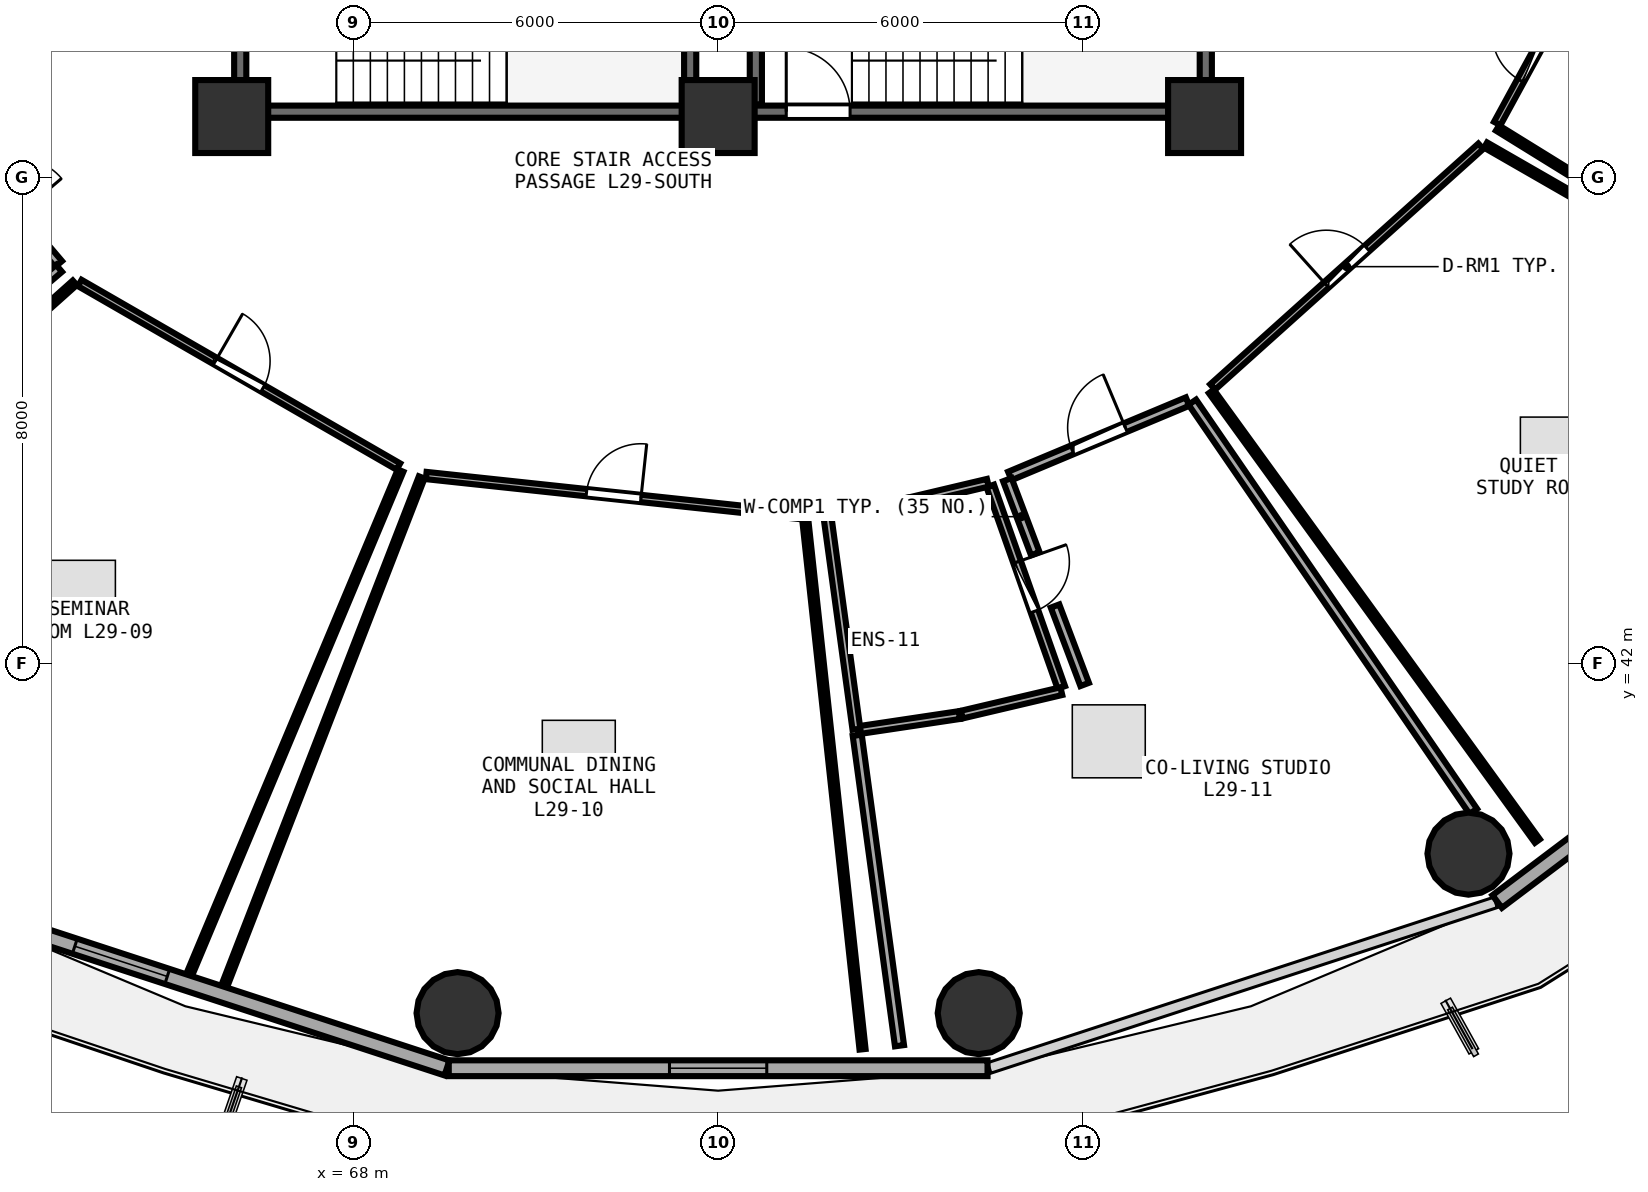
"""IFC4 building model, lengths in metres.
Left out: names, types, materials, properties, quantities, classifications, styles, units other than length and angle.
Written with IfcOpenShell. Run it as: python <this file> out.ifc"""

import sys

from ifc_helpers import new_model, si_unit, direction, frame, frame_2d, origin, origin_2d, place, context, subcontext, project, spatial, rectangle, circle, extrude, element, fill, save


model = new_model("IFC4")
c1 = context("Model", 3, precision=1e-05, world=origin(), true_north=direction((0.0, 1.0)))
c2 = subcontext(c1, "Body", "Model", "MODEL_VIEW")
j1 = project(units=[si_unit("LENGTHUNIT", "METRE"), si_unit("PLANEANGLEUNIT", "RADIAN")], contexts=[c1])
p1 = place(None, origin())
s1 = spatial("IfcSite", under=j1, at=p1, CompositionType="ELEMENT")
p2 = place(p1, origin())
s2 = spatial("IfcBuilding", under=s1, at=p2, CompositionType="ELEMENT")
p3 = place(p2, frame((0.0, 0.0, 113.85)))
s3 = spatial("IfcBuildingStorey", under=s2, at=p3, CompositionType="ELEMENT", Elevation=113.85)
for number, where, z_axis, x_axis in (
    (1, (66.0, 51.0, 0.0), (0.0, 0.0, 1.0), (1.0, 0.0, 0.0)),
    (2, (74.0, 51.0, 0.0), (0.0, 0.0, 1.0), (1.0, 0.0, 0.0)),
    (3, (82.0, 51.0, 0.0), (0.0, 0.0, 1.0), (1.0, 0.0, 0.0)),
):
    element("IfcColumn", number, at=place(p3, frame(where, z_axis=z_axis, x_axis=x_axis)), inside=s3, PredefinedType="PILASTER", context=c2, shape_type="SweptSolid", body=[
        extrude(rectangle(XDim=1.2, YDim=1.2, at=origin_2d()), origin(), (0.0, 0.0, 1.0), 3.75),
    ])
for number, where, z_axis, x_axis in (
    (4, (69.714, 36.255, 0.0), (0.0, 0.0, 1.0), (1.0, 0.0, 0.0)),
    (5, (78.286, 36.255, 0.0), (0.0, 0.0, 1.0), (1.0, 0.0, 0.0)),
    (6, (86.34, 38.878, 0.0), (0.0, 0.0, 1.0), (1.0, 0.0, 0.0)),
):
    element("IfcColumn", number, at=place(p3, frame(where, z_axis=z_axis, x_axis=x_axis)), inside=s3, PredefinedType="COLUMN", context=c2, shape_type="SweptSolid", body=[
        extrude(circle(Radius=0.675, at=origin_2d()), origin(), (0.0, 0.0, 1.0), 3.75),
    ])
p4 = place(p3, frame((61.214, 38.077, 0.0), z_axis=(0.0, 0.0, 1.0), x_axis=(0.950471101963, -0.310812941064, 0.0)))
e7 = element("IfcWall", 7, at=p4, inside=s3, PredefinedType="SOLIDWALL", context=c2, shape_type="SweptSolid", body=[
    extrude(rectangle(XDim=8.76, YDim=0.26, at=frame_2d((4.38, 0.0))), origin(), (0.0, 0.0, 1.0), 3.475),
])
p5 = place(p4, frame((2.32, 0.0, 0.85)))
e8 = element("IfcOpeningElement", 8, at=p5, cuts=e7, PredefinedType="OPENING", context=c2, shape_type="SweptSolid", body=[
    extrude(rectangle(XDim=1.6, YDim=1.45, at=frame_2d((0.8, 0.725))), frame((0.0, 0.14, 0.0), z_axis=(0.0, -1.0, 0.0), x_axis=(1.0, 0.0, 0.0)), (0.0, 0.0, 1.0), 0.28),
])
p6 = place(p3, frame((69.57, 35.349, 0.0), z_axis=(0.0, 0.0, 1.0), x_axis=(1.0, 0.0, 0.0)))
e9 = element("IfcWall", 9, at=p6, inside=s3, PredefinedType="SOLIDWALL", context=c2, shape_type="SweptSolid", body=[
    extrude(rectangle(XDim=8.861, YDim=0.26, at=frame_2d((4.43, 0.0))), origin(), (0.0, 0.0, 1.0), 3.475),
])
p7 = place(p6, frame((3.63, 0.0, 0.85)))
e10 = element("IfcOpeningElement", 10, at=p7, cuts=e9, PredefinedType="OPENING", context=c2, shape_type="SweptSolid", body=[
    extrude(rectangle(XDim=1.6, YDim=1.45, at=frame_2d((0.8, 0.725))), frame((0.0, 0.14, 0.0), z_axis=(0.0, -1.0, 0.0), x_axis=(1.0, 0.0, 0.0)), (0.0, 0.0, 1.0), 0.28),
])
p8 = place(p3, frame((86.812, 38.09, 0.0), z_axis=(0.0, 0.0, 1.0), x_axis=(0.798501507879, 0.601992808857, 0.0)))
e11 = element("IfcWall", 11, at=p8, inside=s3, PredefinedType="SOLIDWALL", context=c2, shape_type="SweptSolid", body=[
    extrude(rectangle(XDim=8.499, YDim=0.26, at=frame_2d((4.25, 0.0))), origin(), (0.0, 0.0, 1.0), 3.475),
])
p9 = place(p8, frame((3.45, 0.0, 0.85)))
e12 = element("IfcOpeningElement", 12, at=p9, cuts=e11, PredefinedType="OPENING", context=c2, shape_type="SweptSolid", body=[
    extrude(rectangle(XDim=1.6, YDim=1.45, at=frame_2d((0.8, 0.725))), frame((0.0, 0.14, 0.0), z_axis=(0.0, -1.0, 0.0), x_axis=(1.0, 0.0, 0.0)), (0.0, 0.0, 1.0), 0.28),
])
p10 = place(p3, frame((74.0, 51.08, 0.0), z_axis=(0.0, 0.0, 1.0), x_axis=(1.0, 0.0, 0.0)))
e13 = element("IfcWall", 13, at=p10, inside=s3, PredefinedType="SHEAR", context=c2, shape_type="SweptSolid", body=[
    extrude(rectangle(XDim=7.9, YDim=0.2, at=frame_2d((3.95, 0.0))), origin(), (0.0, 0.0, 1.0), 3.49),
])
p11 = place(p10, frame((1.12, 0.0, 0.0)))
e14 = element("IfcOpeningElement", 14, at=p11, cuts=e13, PredefinedType="OPENING", context=c2, shape_type="SweptSolid", body=[
    extrude(rectangle(XDim=1.05, YDim=2.1, at=frame_2d((0.525, 1.05))), frame((0.0, 0.11, 0.0), z_axis=(0.0, -1.0, 0.0), x_axis=(1.0, 0.0, 0.0)), (0.0, 0.0, 1.0), 0.22),
])
for number, where, z_axis, x_axis in (
    (15, (82.02, 51.2, 0.0), (0.0, 0.0, 1.0), (0.0, 1.0, 0.0)),
    (16, (74.62, 54.27, 0.0), (0.0, 0.0, 1.0), (0.0, -1.0, 0.0)),
):
    element("IfcWall", number, at=place(p3, frame(where, z_axis=z_axis, x_axis=x_axis)), inside=s3, PredefinedType="SHEAR", context=c2, shape_type="SweptSolid", body=[
        extrude(rectangle(XDim=3.07, YDim=0.2, at=frame_2d((1.535, 0.0))), origin(), (0.0, 0.0, 1.0), 3.49),
    ])
p12 = place(p3, frame((66.26, 51.08, 0.0), z_axis=(0.0, 0.0, 1.0), x_axis=(1.0, 0.0, 0.0)))
e17 = element("IfcWall", 17, at=p12, inside=s3, PredefinedType="SHEAR", context=c2, shape_type="SweptSolid", body=[
    extrude(rectangle(XDim=7.16, YDim=0.2, at=frame_2d((3.58, 0.0))), origin(), (0.0, 0.0, 1.0), 3.49),
])
p13 = place(p3, frame((73.54, 51.2, 0.0), z_axis=(0.0, 0.0, 1.0), x_axis=(0.0, 1.0, 0.0)))
e18 = element("IfcWall", 18, at=p13, inside=s3, PredefinedType="SHEAR", context=c2, shape_type="SweptSolid", body=[
    extrude(rectangle(XDim=3.07, YDim=0.2, at=frame_2d((1.535, 0.0))), origin(), (0.0, 0.0, 1.0), 3.49),
])
p14 = place(p3, frame((66.14, 54.27, 0.0), z_axis=(0.0, 0.0, 1.0), x_axis=(0.0, -1.0, 0.0)))
e19 = element("IfcWall", 19, at=p14, inside=s3, PredefinedType="SHEAR", context=c2, shape_type="SweptSolid", body=[
    extrude(rectangle(XDim=3.07, YDim=0.2, at=frame_2d((1.535, 0.0))), origin(), (0.0, 0.0, 1.0), 3.49),
])
p15 = place(p14, frame((1.01, 0.0, 0.0)))
e20 = element("IfcOpeningElement", 20, at=p15, cuts=e19, PredefinedType="OPENING", context=c2, shape_type="SweptSolid", body=[
    extrude(rectangle(XDim=1.05, YDim=2.1, at=frame_2d((0.525, 1.05))), frame((0.0, 0.11, 0.0), z_axis=(0.0, -1.0, 0.0), x_axis=(1.0, 0.0, 0.0)), (0.0, 0.0, 1.0), 0.22),
])
p16 = place(p3, frame((61.189, 50.883, 0.0), z_axis=(0.0, 0.0, 1.0), x_axis=(0.647807427381, -0.761804132983, 0.0)))
e21 = element("IfcWall", 21, at=p16, inside=s3, PredefinedType="PARTITIONING", context=c2, shape_type="SweptSolid", body=[
    extrude(rectangle(XDim=3.031, YDim=0.15, at=frame_2d((1.515, 0.0))), origin(), (0.0, 0.0, 1.0), 2.925),
])
p17 = place(p16, frame((1.04, 0.0, 0.0)))
e22 = element("IfcOpeningElement", 22, at=p17, cuts=e21, PredefinedType="OPENING", context=c2, shape_type="SweptSolid", body=[
    extrude(rectangle(XDim=0.95, YDim=2.08, at=frame_2d((0.475, 1.04))), frame((0.0, 0.085, 0.0), z_axis=(0.0, -1.0, 0.0), x_axis=(1.0, 0.0, 0.0)), (0.0, 0.0, 1.0), 0.17),
])
p18 = place(p3, frame((63.501, 48.263, 0.0), z_axis=(0.0, 0.0, 1.0), x_axis=(0.866473771155, -0.499222599548, 0.0)))
e23 = element("IfcWall", 23, at=p18, inside=s3, PredefinedType="PARTITIONING", context=c2, shape_type="SweptSolid", body=[
    extrude(rectangle(XDim=6.048, YDim=0.12, at=frame_2d((3.024, 0.0))), origin(), (0.0, 0.0, 1.0), 2.925),
])
p19 = place(p18, frame((2.574, 0.0, 0.0)))
e24 = element("IfcOpeningElement", 24, at=p19, cuts=e23, PredefinedType="OPENING", context=c2, shape_type="SweptSolid", body=[
    extrude(rectangle(XDim=0.9, YDim=2.08, at=frame_2d((0.45, 1.04))), frame((0.0, 0.07, 0.0), z_axis=(0.0, -1.0, 0.0), x_axis=(1.0, 0.0, 0.0)), (0.0, 0.0, 1.0), 0.14),
])
p20 = place(p3, frame((69.199, 45.097, 0.0), z_axis=(0.0, 0.0, 1.0), x_axis=(0.994336816939, -0.10627461823, 0.0)))
e25 = element("IfcWall", 25, at=p20, inside=s3, PredefinedType="PARTITIONING", context=c2, shape_type="SweptSolid", body=[
    extrude(rectangle(XDim=6.203, YDim=0.12, at=frame_2d((3.101, 0.0))), origin(), (0.0, 0.0, 1.0), 3.48),
])
p21 = place(p20, frame((2.651, 0.0, 0.0)))
e26 = element("IfcOpeningElement", 26, at=p21, cuts=e25, PredefinedType="OPENING", context=c2, shape_type="SweptSolid", body=[
    extrude(rectangle(XDim=0.9, YDim=2.08, at=frame_2d((0.45, 1.04))), frame((0.0, 0.07, 0.0), z_axis=(0.0, -1.0, 0.0), x_axis=(1.0, 0.0, 0.0)), (0.0, 0.0, 1.0), 0.14),
])
p22 = place(p3, frame((78.475, 44.925, 0.0), z_axis=(0.0, 0.0, 1.0), x_axis=(0.332667472429, -0.943044194504, 0.0)))
e27 = element("IfcWall", 27, at=p22, inside=s3, PredefinedType="PLUMBINGWALL", context=c2, shape_type="SweptSolid", body=[
    extrude(rectangle(XDim=3.514, YDim=0.13, at=frame_2d((1.757, 0.0))), origin(), (0.0, 0.0, 1.0), 2.925),
])
p23 = place(p22, frame((1.327, 0.0, 0.0)))
e28 = element("IfcOpeningElement", 28, at=p23, cuts=e27, PredefinedType="OPENING", context=c2, shape_type="SweptSolid", body=[
    extrude(rectangle(XDim=0.86, YDim=2.05, at=frame_2d((0.43, 1.025))), frame((0.0, 0.075, 0.0), z_axis=(0.0, -1.0, 0.0), x_axis=(1.0, 0.0, 0.0)), (0.0, 0.0, 1.0), 0.15),
])
p24 = place(p3, frame((78.797, 45.089, 0.0), z_axis=(0.0, 0.0, 1.0), x_axis=(0.922451198241, 0.386113696809, 0.0)))
e29 = element("IfcWall", 29, at=p24, inside=s3, PredefinedType="PARTITIONING", context=c2, shape_type="SweptSolid", body=[
    extrude(rectangle(XDim=3.169, YDim=0.15, at=frame_2d((1.584, 0.0))), origin(), (0.0, 0.0, 1.0), 2.925),
])
p25 = place(p24, frame((1.11, 0.0, 0.0)))
e30 = element("IfcOpeningElement", 30, at=p25, cuts=e29, PredefinedType="OPENING", context=c2, shape_type="SweptSolid", body=[
    extrude(rectangle(XDim=0.95, YDim=2.08, at=frame_2d((0.475, 1.04))), frame((0.0, 0.085, 0.0), z_axis=(0.0, -1.0, 0.0), x_axis=(1.0, 0.0, 0.0)), (0.0, 0.0, 1.0), 0.17),
])
p26 = place(p3, frame((82.133, 46.552, 0.0), z_axis=(0.0, 0.0, 1.0), x_axis=(0.744127280309, 0.668037866217, 0.0)))
e31 = element("IfcWall", 31, at=p26, inside=s3, PredefinedType="PARTITIONING", context=c2, shape_type="SweptSolid", body=[
    extrude(rectangle(XDim=5.926, YDim=0.12, at=frame_2d((2.963, 0.0))), origin(), (0.0, 0.0, 1.0), 2.925),
])
p27 = place(p26, frame((2.513, 0.0, 0.0)))
e32 = element("IfcOpeningElement", 32, at=p27, cuts=e31, PredefinedType="OPENING", context=c2, shape_type="SweptSolid", body=[
    extrude(rectangle(XDim=0.9, YDim=2.08, at=frame_2d((0.45, 1.04))), frame((0.0, 0.07, 0.0), z_axis=(0.0, -1.0, 0.0), x_axis=(1.0, 0.0, 0.0)), (0.0, 0.0, 1.0), 0.14),
])
p28 = place(p3, frame((86.813, 50.885, 0.0), z_axis=(0.0, 0.0, 1.0), x_axis=(0.478749799851, 0.877951381993, 0.0)))
e33 = element("IfcWall", 33, at=p28, inside=s3, PredefinedType="PARTITIONING", context=c2, shape_type="SweptSolid", body=[
    extrude(rectangle(XDim=2.508, YDim=0.12, at=frame_2d((1.254, 0.0))), origin(), (0.0, 0.0, 1.0), 2.925),
])
p29 = place(p28, frame((0.804, 0.0, 0.0)))
e34 = element("IfcOpeningElement", 34, at=p29, cuts=e33, PredefinedType="OPENING", context=c2, shape_type="SweptSolid", body=[
    extrude(rectangle(XDim=0.9, YDim=2.08, at=frame_2d((0.45, 1.04))), frame((0.0, 0.07, 0.0), z_axis=(0.0, -1.0, 0.0), x_axis=(1.0, 0.0, 0.0)), (0.0, 0.0, 1.0), 0.14),
])
p30 = place(p3, frame((63.16, 48.503, 0.0), z_axis=(0.0, 0.0, 1.0), x_axis=(-0.761665255774, -0.647970707784, 0.0)))
e35 = element("IfcWall", 35, at=p30, inside=s3, PredefinedType="PARTITIONING", context=c2, shape_type="SweptSolid", body=[
    extrude(rectangle(XDim=9.41, YDim=0.15, at=frame_2d((4.705, 0.0))), origin(), (0.0, 0.0, 1.0), 2.975),
])
p31 = place(p3, frame((68.778, 45.177, 0.0), z_axis=(0.0, 0.0, 1.0), x_axis=(-0.386794233591, -0.922166048421, 0.0)))
e36 = element("IfcWall", 36, at=p31, inside=s3, PredefinedType="PARTITIONING", context=c2, shape_type="SweptSolid", body=[
    extrude(rectangle(XDim=8.923, YDim=0.1, at=frame_2d((4.461, 0.0))), origin(), (0.0, 0.0, 1.0), 2.925),
])
p32 = place(p3, frame((56.424, 42.017, 0.0), z_axis=(0.0, 0.0, 1.0), x_axis=(0.745731207234, 0.666246926115, 0.0)))
e37 = element("IfcWall", 37, at=p32, inside=s3, PredefinedType="PARTITIONING", context=c2, shape_type="SweptSolid", body=[
    extrude(rectangle(XDim=9.381, YDim=0.1, at=frame_2d((4.69, 0.0))), origin(), (0.0, 0.0, 1.0), 2.975),
])
p33 = place(p3, frame((75.43, 44.391, 0.0), z_axis=(0.0, 0.0, 1.0), x_axis=(0.107541262508, -0.994200622037, 0.0)))
e38 = element("IfcWall", 38, at=p33, inside=s3, PredefinedType="PARTITIONING", context=c2, shape_type="SweptSolid", body=[
    extrude(rectangle(XDim=8.781, YDim=0.1, at=frame_2d((4.391, 0.0))), origin(), (0.0, 0.0, 1.0), 2.975),
])
p34 = place(p3, frame((65.903, 36.765, 0.0), z_axis=(0.0, 0.0, 1.0), x_axis=(0.361863971294, 0.932230908241, 0.0)))
e39 = element("IfcWall", 39, at=p34, inside=s3, PredefinedType="PARTITIONING", context=c2, shape_type="SweptSolid", body=[
    extrude(rectangle(XDim=8.904, YDim=0.1, at=frame_2d((4.452, 0.0))), origin(), (0.0, 0.0, 1.0), 2.925),
])
p35 = place(p3, frame((75.811, 44.47, 0.0), z_axis=(0.0, 0.0, 1.0), x_axis=(0.98880166122, 0.149235635049, 0.0)))
e40 = element("IfcWall", 40, at=p35, inside=s3, PredefinedType="PLUMBINGWALL", context=c2, shape_type="SweptSolid", body=[
    extrude(rectangle(XDim=1.32, YDim=0.13, at=frame_2d((0.66, 0.0))), origin(), (0.0, 0.0, 1.0), 3.48),
])
p36 = place(p3, frame((77.156, 44.675, 0.0), z_axis=(0.0, 0.0, 1.0), x_axis=(0.9731536302, 0.23015649465, 0.0)))
e41 = element("IfcWall", 41, at=p36, inside=s3, PredefinedType="PLUMBINGWALL", context=c2, shape_type="SweptSolid", body=[
    extrude(rectangle(XDim=1.315, YDim=0.13, at=frame_2d((0.658, 0.0))), origin(), (0.0, 0.0, 1.0), 3.48),
])
p37 = place(p3, frame((79.645, 41.55, 0.0), z_axis=(0.0, 0.0, 1.0), x_axis=(-0.973371483065, -0.229233409337, 0.0)))
e42 = element("IfcWall", 42, at=p37, inside=s3, PredefinedType="PLUMBINGWALL", context=c2, shape_type="SweptSolid", body=[
    extrude(rectangle(XDim=1.683, YDim=0.13, at=frame_2d((0.841, 0.0))), origin(), (0.0, 0.0, 1.0), 2.925),
])
p38 = place(p3, frame((77.967, 41.157, 0.0), z_axis=(0.0, 0.0, 1.0), x_axis=(-0.988985070507, -0.148015304326, 0.0)))
e43 = element("IfcWall", 43, at=p38, inside=s3, PredefinedType="PLUMBINGWALL", context=c2, shape_type="SweptSolid", body=[
    extrude(rectangle(XDim=1.689, YDim=0.13, at=frame_2d((0.844, 0.0))), origin(), (0.0, 0.0, 1.0), 3.48),
])
p39 = place(p3, frame((76.274, 40.924, 0.0), z_axis=(0.0, 0.0, 1.0), x_axis=(-0.135180605541, 0.99082097469, 0.0)))
e44 = element("IfcWall", 44, at=p39, inside=s3, PredefinedType="PLUMBINGWALL", context=c2, shape_type="SweptSolid", body=[
    extrude(rectangle(XDim=3.556, YDim=0.13, at=frame_2d((1.778, 0.0))), origin(), (0.0, 0.0, 1.0), 3.175),
])
p40 = place(p3, frame((81.799, 46.303, 0.0), z_axis=(0.0, 0.0, 1.0), x_axis=(0.566050189738, -0.824370779866, 0.0)))
e45 = element("IfcWall", 45, at=p40, inside=s3, PredefinedType="PARTITIONING", context=c2, shape_type="SweptSolid", body=[
    extrude(rectangle(XDim=8.163, YDim=0.15, at=frame_2d((4.082, 0.0))), origin(), (0.0, 0.0, 1.0), 2.925),
])
p41 = place(p3, frame((76.983, 35.719, 0.0), z_axis=(0.0, 0.0, 1.0), x_axis=(-0.134956721903, 0.990851494026, 0.0)))
e46 = element("IfcWall", 46, at=p41, inside=s3, PredefinedType="PARTITIONING", context=c2, shape_type="SweptSolid", body=[
    extrude(rectangle(XDim=5.152, YDim=0.15, at=frame_2d((2.576, 0.0))), origin(), (0.0, 0.0, 1.0), 2.975),
])
p42 = place(p3, frame((80.028, 41.66, 0.0), z_axis=(0.0, 0.0, 1.0), x_axis=(-0.353218077886, 0.935541014309, 0.0)))
e47 = element("IfcWall", 47, at=p42, inside=s3, PredefinedType="PARTITIONING", context=c2, shape_type="SweptSolid", body=[
    extrude(rectangle(XDim=1.379, YDim=0.15, at=frame_2d((0.689, 0.0))), origin(), (0.0, 0.0, 1.0), 2.925),
])
p43 = place(p3, frame((79.216, 43.811, 0.0), z_axis=(0.0, 0.0, 1.0), x_axis=(-0.353302050307, 0.935509305806, 0.0)))
e48 = element("IfcWall", 48, at=p43, inside=s3, PredefinedType="PARTITIONING", context=c2, shape_type="SweptSolid", body=[
    extrude(rectangle(XDim=1.301, YDim=0.15, at=frame_2d((0.651, 0.0))), origin(), (0.0, 0.0, 1.0), 3.48),
])
p44 = place(p3, frame((86.622, 50.531, 0.0), z_axis=(0.0, 0.0, 1.0), x_axis=(0.867006010233, -0.498297680328, 0.0)))
e49 = element("IfcWall", 49, at=p44, inside=s3, PredefinedType="PARTITIONING", context=c2, shape_type="SweptSolid", body=[
    extrude(rectangle(XDim=9.627, YDim=0.1, at=frame_2d((4.813, 0.0))), origin(), (0.0, 0.0, 1.0), 2.975),
])
p45 = place(p3, frame((87.473, 39.085, 0.0), z_axis=(0.0, 0.0, 1.0), x_axis=(-0.587049040353, 0.809551372194, 0.0)))
e50 = element("IfcWall", 50, at=p45, inside=s3, PredefinedType="PARTITIONING", context=c2, shape_type="SweptSolid", body=[
    extrude(rectangle(XDim=9.134, YDim=0.1, at=frame_2d((4.567, 0.0))), origin(), (0.0, 0.0, 1.0), 2.925),
])
p46 = place(p3, frame((88.424, 49.818, 0.0), z_axis=(0.0, 0.0, 1.0), x_axis=(-0.850546182958, 0.525900361908, 0.0)))
e51 = element("IfcWall", 51, at=p46, inside=s3, PredefinedType="PARTITIONING", context=c2, shape_type="SweptSolid", body=[
    extrude(rectangle(XDim=1.888, YDim=0.1, at=frame_2d((0.944, 0.0))), origin(), (0.0, 0.0, 1.0), 2.925),
])
p47 = place(p5, origin())
e52 = element("IfcWindow", 52, at=p47, inside=s3, PartitioningType="SINGLE_PANEL", PredefinedType="WINDOW", context=c2, shape_type="SweptSolid", body=[
    extrude(rectangle(XDim=1.6, YDim=1.45, at=frame_2d((0.8, 0.725))), frame((0.0, 0.03, 0.0), z_axis=(0.0, -1.0, 0.0), x_axis=(1.0, 0.0, 0.0)), (0.0, 0.0, 1.0), 0.06),
])
fill(e8, e52)
p48 = place(p7, origin())
e53 = element("IfcWindow", 53, at=p48, inside=s3, PartitioningType="SINGLE_PANEL", PredefinedType="WINDOW", context=c2, shape_type="SweptSolid", body=[
    extrude(rectangle(XDim=1.6, YDim=1.45, at=frame_2d((0.8, 0.725))), frame((0.0, 0.03, 0.0), z_axis=(0.0, -1.0, 0.0), x_axis=(1.0, 0.0, 0.0)), (0.0, 0.0, 1.0), 0.06),
])
fill(e10, e53)
p49 = place(p11, origin())
e54 = element("IfcDoor", 54, at=p49, inside=s3, OperationType="SINGLE_SWING_LEFT", PredefinedType="DOOR", context=c2, shape_type="SweptSolid", body=[
    extrude(rectangle(XDim=1.05, YDim=2.1, at=frame_2d((0.525, 1.05))), frame((0.0, 0.025, 0.0), z_axis=(0.0, -1.0, 0.0), x_axis=(1.0, 0.0, 0.0)), (0.0, 0.0, 1.0), 0.05),
])
fill(e14, e54)
p50 = place(p19, origin())
e55 = element("IfcDoor", 55, at=p50, inside=s3, OperationType="SINGLE_SWING_LEFT", PredefinedType="DOOR", context=c2, shape_type="SweptSolid", body=[
    extrude(rectangle(XDim=0.9, YDim=2.08, at=frame_2d((0.45, 1.04))), frame((0.0, 0.025, 0.0), z_axis=(0.0, -1.0, 0.0), x_axis=(1.0, 0.0, 0.0)), (0.0, 0.0, 1.0), 0.05),
])
fill(e24, e55)
p51 = place(p21, origin())
e56 = element("IfcDoor", 56, at=p51, inside=s3, OperationType="SINGLE_SWING_RIGHT", PredefinedType="DOOR", context=c2, shape_type="SweptSolid", body=[
    extrude(rectangle(XDim=0.9, YDim=2.08, at=frame_2d((0.45, 1.04))), frame((0.0, 0.025, 0.0), z_axis=(0.0, -1.0, 0.0), x_axis=(1.0, 0.0, 0.0)), (0.0, 0.0, 1.0), 0.05),
])
fill(e26, e56)
p52 = place(p23, origin())
e57 = element("IfcDoor", 57, at=p52, inside=s3, OperationType="SINGLE_SWING_LEFT", PredefinedType="DOOR", context=c2, shape_type="SweptSolid", body=[
    extrude(rectangle(XDim=0.86, YDim=2.05, at=frame_2d((0.43, 1.025))), frame((0.0, 0.025, 0.0), z_axis=(0.0, -1.0, 0.0), x_axis=(1.0, 0.0, 0.0)), (0.0, 0.0, 1.0), 0.05),
])
fill(e28, e57)
p53 = place(p25, origin())
e58 = element("IfcDoor", 58, at=p53, inside=s3, OperationType="SINGLE_SWING_RIGHT", PredefinedType="DOOR", context=c2, shape_type="SweptSolid", body=[
    extrude(rectangle(XDim=0.95, YDim=2.08, at=frame_2d((0.475, 1.04))), frame((0.0, 0.025, 0.0), z_axis=(0.0, -1.0, 0.0), x_axis=(1.0, 0.0, 0.0)), (0.0, 0.0, 1.0), 0.05),
])
fill(e30, e58)
p54 = place(p27, origin())
e59 = element("IfcDoor", 59, at=p54, inside=s3, OperationType="SINGLE_SWING_LEFT", PredefinedType="DOOR", context=c2, shape_type="SweptSolid", body=[
    extrude(rectangle(XDim=0.9, YDim=2.08, at=frame_2d((0.45, 1.04))), frame((0.0, 0.025, 0.0), z_axis=(0.0, -1.0, 0.0), x_axis=(1.0, 0.0, 0.0)), (0.0, 0.0, 1.0), 0.05),
])
fill(e32, e59)
p55 = place(p29, origin())
e60 = element("IfcDoor", 60, at=p55, inside=s3, OperationType="SINGLE_SWING_RIGHT", PredefinedType="DOOR", context=c2, shape_type="SweptSolid", body=[
    extrude(rectangle(XDim=0.9, YDim=2.08, at=frame_2d((0.45, 1.04))), frame((0.0, 0.025, 0.0), z_axis=(0.0, -1.0, 0.0), x_axis=(1.0, 0.0, 0.0)), (0.0, 0.0, 1.0), 0.05),
])
fill(e34, e60)
save(model, sys.argv[1])
